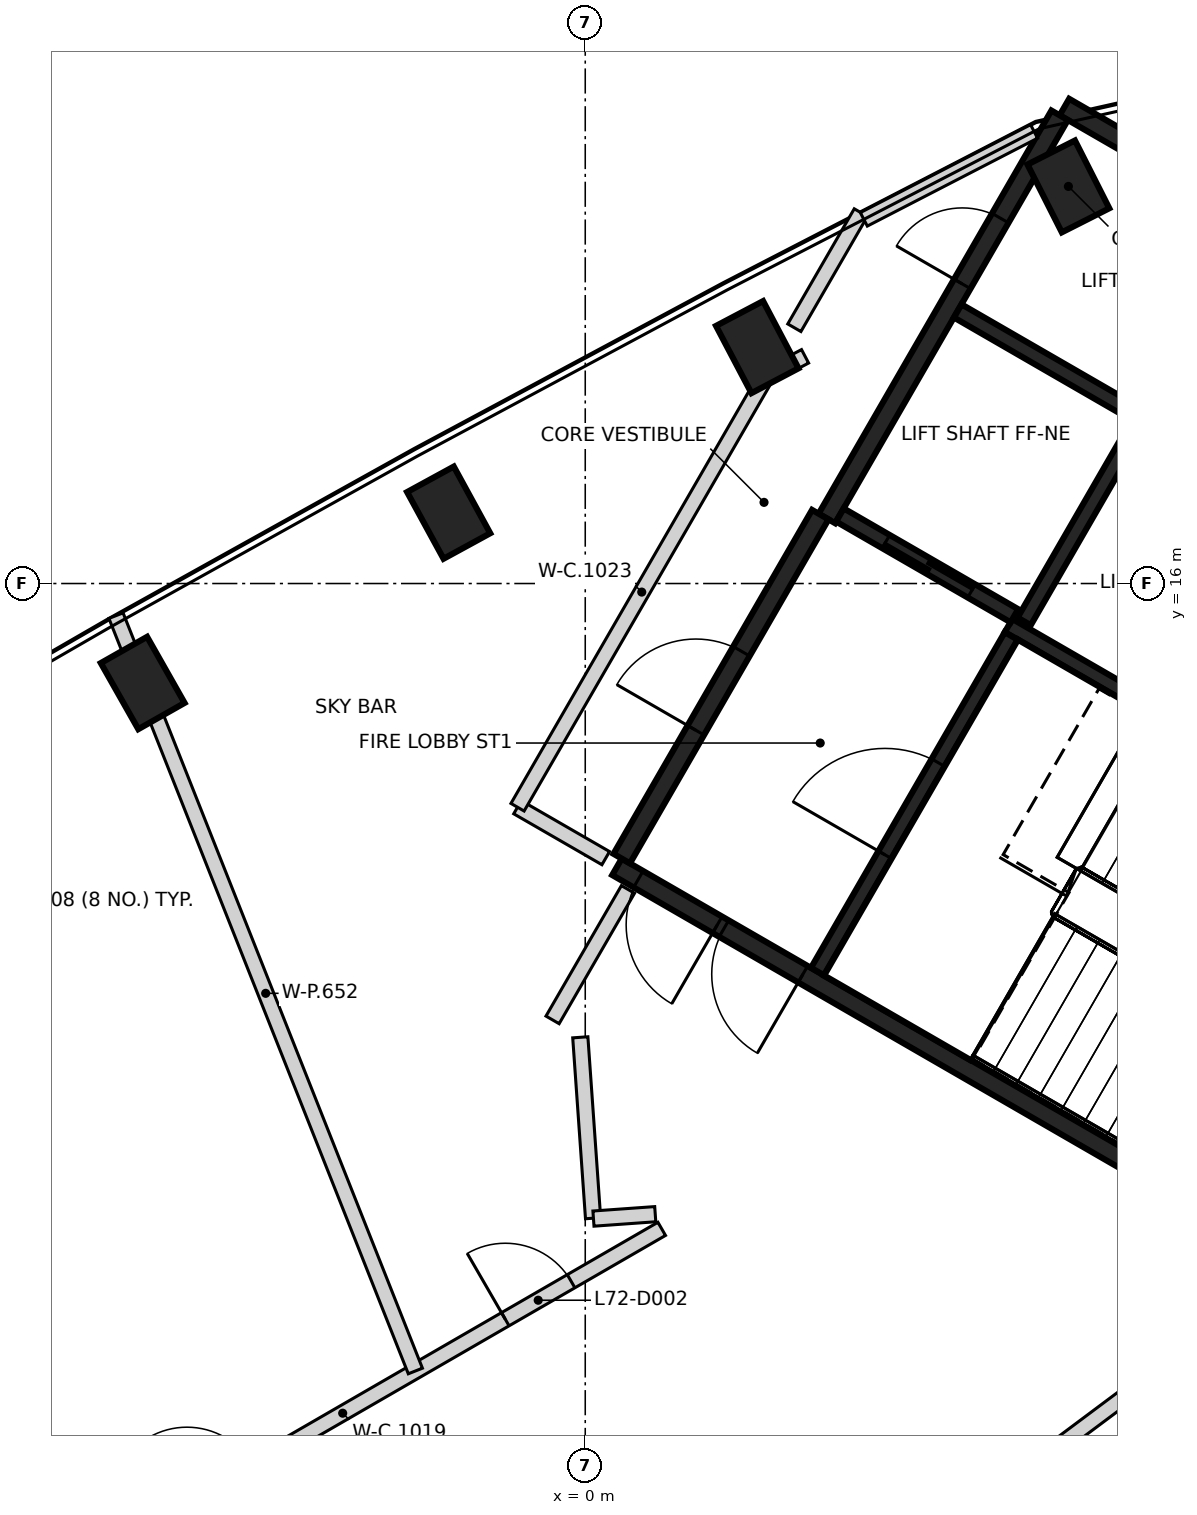
"""IFC4 building model, lengths in metres.
Left out: names, types, materials, properties, quantities, classifications, styles, units other than length and angle.
Written with IfcOpenShell. Run it as: python <this file> out.ifc"""

import sys

from ifc_helpers import new_model, si_unit, direction, frame, frame_2d, origin, origin_2d, place, context, subcontext, project, spatial, rectangle, extrude, element, fill, save


model = new_model("IFC4")
c1 = context("Model", 3, precision=1e-05, world=origin(), true_north=direction((0.0, 1.0)))
c2 = subcontext(c1, "Body", "Model", "MODEL_VIEW")
j1 = project(units=[si_unit("LENGTHUNIT", "METRE"), si_unit("PLANEANGLEUNIT", "RADIAN")], contexts=[c1])
p1 = place(None, origin())
s1 = spatial("IfcSite", under=j1, at=p1, CompositionType="ELEMENT")
p2 = place(p1, origin())
s2 = spatial("IfcBuilding", under=s1, at=p2, CompositionType="ELEMENT")
p3 = place(p2, frame((0.0, 0.0, 283.8)))
s3 = spatial("IfcBuildingStorey", under=s2, at=p3, CompositionType="ELEMENT", Elevation=283.8)
for number, where, z_axis, x_axis in (
    (1, (6.356, 21.224, -0.35), (0.0, 0.0, 1.0), (-0.452, 0.892, 0.0)),
    (2, (2.263, 19.11, -0.35), (0.0, 0.0, 1.0), (-0.466, 0.885, 0.0)),
    (3, (-1.797, 16.932, -0.35), (0.0, 0.0, 1.0), (-0.479, 0.878, 0.0)),
    (4, (-5.822, 14.691, -0.35), (0.0, 0.0, 1.0), (-0.493, 0.87, 0.0)),
):
    element("IfcColumn", number, at=place(p3, frame(where, z_axis=z_axis, x_axis=x_axis)), inside=s3, PredefinedType="COLUMN", context=c2, shape_type="SweptSolid", body=[
        extrude(rectangle(XDim=1.0, YDim=0.7, at=origin_2d()), origin(), (0.0, 0.0, 1.0), 7.2),
    ])
p4 = place(p3, frame((10.42, 6.498, 0.0), z_axis=(0.0, 0.0, 1.0), x_axis=(-0.866021906294, 0.500006057782, 0.0)))
e5 = element("IfcWall", 5, at=p4, inside=s3, PredefinedType="SHEAR", context=c2, shape_type="SweptSolid", body=[
    extrude(rectangle(XDim=11.55, YDim=0.25, at=frame_2d((5.775, 0.0))), origin(), (0.0, 0.0, 1.0), 6.85),
])
p5 = place(p4, frame((10.025, 0.0, 0.0)))
e6 = element("IfcOpeningElement", 6, at=p5, cuts=e5, PredefinedType="OPENING", context=c2, shape_type="SweptSolid", body=[
    extrude(rectangle(XDim=1.2, YDim=2.1, at=frame_2d((0.6, 1.05))), frame((0.0, 0.135, 0.0), z_axis=(0.0, -1.0, 0.0), x_axis=(1.0, 0.0, 0.0)), (0.0, 0.0, 1.0), 0.27),
])
p6 = place(p4, frame((8.725, 0.0, 0.0)))
e7 = element("IfcOpeningElement", 7, at=p6, cuts=e5, PredefinedType="OPENING", context=c2, shape_type="SweptSolid", body=[
    extrude(rectangle(XDim=1.2, YDim=2.1, at=frame_2d((0.6, 1.05))), frame((0.0, 0.135, 0.0), z_axis=(0.0, -1.0, 0.0), x_axis=(1.0, 0.0, 0.0)), (0.0, 0.0, 1.0), 0.27),
])
p7 = place(p3, frame((6.304, 22.269, 0.0), z_axis=(0.0, 0.0, 1.0), x_axis=(0.866022959057, -0.500004234368, 0.0)))
e8 = element("IfcWall", 8, at=p7, inside=s3, PredefinedType="SHEAR", context=c2, shape_type="SweptSolid", body=[
    extrude(rectangle(XDim=8.75, YDim=0.25, at=frame_2d((4.375, 0.0))), origin(), (0.0, 0.0, 1.0), 6.85),
])
p8 = place(p7, frame((3.475, 0.0, 0.0)))
e9 = element("IfcOpeningElement", 9, at=p8, cuts=e8, PredefinedType="OPENING", context=c2, shape_type="SweptSolid", body=[
    extrude(rectangle(XDim=0.9, YDim=2.1, at=frame_2d((0.45, 1.05))), frame((0.0, 0.135, 0.0), z_axis=(0.0, -1.0, 0.0), x_axis=(1.0, 0.0, 0.0)), (0.0, 0.0, 1.0), 0.27),
])
p9 = place(p3, frame((3.179, 16.856, 0.0), z_axis=(0.0, 0.0, 1.0), x_axis=(0.500001955336, 0.866024274868, 0.0)))
e10 = element("IfcWall", 10, at=p9, inside=s3, PredefinedType="SHEAR", context=c2, shape_type="SweptSolid", body=[
    extrude(rectangle(XDim=6.125, YDim=0.25, at=frame_2d((3.062, 0.0))), origin(), (0.0, 0.0, 1.0), 6.85),
])
p10 = place(p9, frame((3.563, 0.0, 0.0)))
e11 = element("IfcOpeningElement", 11, at=p10, cuts=e10, PredefinedType="OPENING", context=c2, shape_type="SweptSolid", body=[
    extrude(rectangle(XDim=1.0, YDim=2.1, at=frame_2d((0.5, 1.05))), frame((0.0, 0.135, 0.0), z_axis=(0.0, -1.0, 0.0), x_axis=(1.0, 0.0, 0.0)), (0.0, 0.0, 1.0), 0.27),
])
p11 = place(p3, frame((0.48, 12.381, 0.0), z_axis=(0.0, 0.0, 1.0), x_axis=(0.49999885962, 0.866026062182, 0.0)))
e12 = element("IfcWall", 12, at=p11, inside=s3, PredefinedType="SHEAR", context=c2, shape_type="SweptSolid", body=[
    extrude(rectangle(XDim=5.225, YDim=0.25, at=frame_2d((2.612, 0.0))), origin(), (0.0, 0.0, 1.0), 6.85),
])
p12 = place(p11, frame((1.949, 0.0, 0.0)))
e13 = element("IfcOpeningElement", 13, at=p12, cuts=e12, PredefinedType="OPENING", context=c2, shape_type="SweptSolid", body=[
    extrude(rectangle(XDim=1.2, YDim=2.1, at=frame_2d((0.6, 1.05))), frame((0.0, 0.135, 0.0), z_axis=(0.0, -1.0, 0.0), x_axis=(1.0, 0.0, 0.0)), (0.0, 0.0, 1.0), 0.27),
])
p13 = place(p3, frame((10.743, 12.46, 0.0), z_axis=(0.0, 0.0, 1.0), x_axis=(-0.866018848283, 0.500011354289, 0.0)))
e14 = element("IfcWall", 14, at=p13, inside=s3, PredefinedType="SHEAR", context=c2, shape_type="SweptSolid", body=[
    extrude(rectangle(XDim=5.974, YDim=0.2, at=frame_2d((2.987, 0.0))), origin(), (0.0, 0.0, 1.0), 6.85),
])
p14 = place(p3, frame((3.057, 10.895, 0.0), z_axis=(0.0, 0.0, 1.0), x_axis=(0.500027839223, 0.866009330205, 0.0)))
e15 = element("IfcWall", 15, at=p14, inside=s3, PredefinedType="SHEAR", context=c2, shape_type="SweptSolid", body=[
    extrude(rectangle(XDim=5.098, YDim=0.2, at=frame_2d((2.549, 0.0))), origin(), (0.0, 0.0, 1.0), 6.85),
])
p15 = place(p14, frame((1.774, 0.0, 0.0)))
e16 = element("IfcOpeningElement", 16, at=p15, cuts=e15, PredefinedType="OPENING", context=c2, shape_type="SweptSolid", body=[
    extrude(rectangle(XDim=1.4, YDim=2.1, at=frame_2d((0.7, 1.05))), frame((0.0, 0.11, 0.0), z_axis=(0.0, -1.0, 0.0), x_axis=(1.0, 0.0, 0.0)), (0.0, 0.0, 1.0), 0.22),
])
p16 = place(p3, frame((7.324, 18.187, 0.0), z_axis=(0.0, 0.0, 1.0), x_axis=(-0.499967891604, -0.866043940782, 0.0)))
e17 = element("IfcWall", 17, at=p16, inside=s3, PredefinedType="SHEAR", context=c2, shape_type="SweptSolid", body=[
    extrude(rectangle(XDim=3.1, YDim=0.2, at=frame_2d((1.55, 0.0))), origin(), (0.0, 0.0, 1.0), 6.85),
])
p17 = place(p3, frame((5.646, 15.576, 0.0), z_axis=(0.0, 0.0, 1.0), x_axis=(-0.866018407898, 0.500012117035, 0.0)))
e18 = element("IfcWall", 18, at=p17, inside=s3, PredefinedType="SHEAR", context=c2, shape_type="SweptSolid", body=[
    extrude(rectangle(XDim=2.651, YDim=0.2, at=frame_2d((1.325, 0.0))), origin(), (0.0, 0.0, 1.0), 6.85),
])
p18 = place(p17, frame((0.652, 0.0, 0.0)))
e19 = element("IfcOpeningElement", 19, at=p18, cuts=e18, PredefinedType="OPENING", context=c2, shape_type="SweptSolid", body=[
    extrude(rectangle(XDim=1.3, YDim=2.1, at=frame_2d((0.65, 1.05))), frame((0.0, 0.11, 0.0), z_axis=(0.0, -1.0, 0.0), x_axis=(1.0, 0.0, 0.0)), (0.0, 0.0, 1.0), 0.22),
])
p19 = place(p3, frame((7.196, 18.26, 0.0), z_axis=(0.0, 0.0, 1.0), x_axis=(-0.866018407898, 0.500012117035, 0.0)))
e20 = element("IfcWall", 20, at=p19, inside=s3, PredefinedType="SHEAR", context=c2, shape_type="SweptSolid", body=[
    extrude(rectangle(XDim=2.651, YDim=0.2, at=frame_2d((1.325, 0.0))), origin(), (0.0, 0.0, 1.0), 6.85),
])
p20 = place(p3, frame((-7.388, 2.659, 0.0), z_axis=(0.0, 0.0, 1.0), x_axis=(0.865840346806, 0.500320391192, 0.0)))
e21 = element("IfcWall", 21, at=p20, inside=s3, PredefinedType="PARTITIONING", context=c2, shape_type="SweptSolid", body=[
    extrude(rectangle(XDim=9.695, YDim=0.2, at=frame_2d((4.848, 0.0))), origin(), (0.0, 0.0, 1.0), 6.85),
])
p21 = place(p20, frame((7.318, 0.0, 0.0)))
e22 = element("IfcOpeningElement", 22, at=p21, cuts=e21, PredefinedType="OPENING", context=c2, shape_type="SweptSolid", body=[
    extrude(rectangle(XDim=1.0, YDim=2.1, at=frame_2d((0.5, 1.05))), frame((0.0, 0.11, 0.0), z_axis=(0.0, -1.0, 0.0), x_axis=(1.0, 0.0, 0.0)), (0.0, 0.0, 1.0), 0.22),
])
p22 = place(p20, frame((2.481, 0.0, 0.0)))
e23 = element("IfcOpeningElement", 23, at=p22, cuts=e21, PredefinedType="OPENING", context=c2, shape_type="SweptSolid", body=[
    extrude(rectangle(XDim=1.0, YDim=2.1, at=frame_2d((0.5, 1.05))), frame((0.0, 0.11, 0.0), z_axis=(0.0, -1.0, 0.0), x_axis=(1.0, 0.0, 0.0)), (0.0, 0.0, 1.0), 0.22),
])
p23 = place(p3, frame((-0.891, 13.057, 0.0), z_axis=(0.0, 0.0, 1.0), x_axis=(0.866082447003, -0.499901185229, 0.0)))
e24 = element("IfcWall", 24, at=p23, inside=s3, PredefinedType="PARTITIONING", context=c2, shape_type="SweptSolid", body=[
    extrude(rectangle(XDim=1.34, YDim=0.2, at=frame_2d((0.67, 0.0))), origin(), (0.0, 0.0, 1.0), 6.85),
])
p24 = place(p3, frame((-0.891, 13.057, 0.0), z_axis=(0.0, 0.0, 1.0), x_axis=(0.499999420379, 0.866025738428, 0.0)))
e25 = element("IfcWall", 25, at=p24, inside=s3, PredefinedType="PARTITIONING", context=c2, shape_type="SweptSolid", body=[
    extrude(rectangle(XDim=6.537, YDim=0.2, at=frame_2d((3.268, 0.0))), origin(), (0.0, 0.0, 1.0), 6.85),
])
p25 = place(p3, frame((-0.43, 10.259, 0.0), z_axis=(0.0, 0.0, 1.0), x_axis=(0.500429403118, 0.865777345797, 0.0)))
e26 = element("IfcWall", 26, at=p25, inside=s3, PredefinedType="PARTITIONING", context=c2, shape_type="SweptSolid", body=[
    extrude(rectangle(XDim=1.983, YDim=0.2, at=frame_2d((0.991, 0.0))), origin(), (0.0, 0.0, 1.0), 6.85),
])
p26 = place(p3, frame((-0.065, 10.03, 0.0), z_axis=(0.0, 0.0, 1.0), x_axis=(0.070396260623, -0.997519105827, 0.0)))
e27 = element("IfcWall", 27, at=p26, inside=s3, PredefinedType="PARTITIONING", context=c2, shape_type="SweptSolid", body=[
    extrude(rectangle(XDim=2.386, YDim=0.2, at=frame_2d((1.193, 0.0))), origin(), (0.0, 0.0, 1.0), 6.85),
])
p27 = place(p3, frame((0.108, 7.645, 0.0), z_axis=(0.0, 0.0, 1.0), x_axis=(0.997476913372, 0.070991600141, 0.0)))
e28 = element("IfcWall", 28, at=p27, inside=s3, PredefinedType="PARTITIONING", context=c2, shape_type="SweptSolid", body=[
    extrude(rectangle(XDim=0.815, YDim=0.2, at=frame_2d((0.407, 0.0))), origin(), (0.0, 0.0, 1.0), 6.85),
])
p28 = place(p3, frame((2.377, 18.718, 0.0), z_axis=(0.0, 0.0, 1.0), x_axis=(0.885009189366, 0.465573554595, 0.0)))
e29 = element("IfcWall", 29, at=p28, inside=s3, PredefinedType="PARTITIONING", context=c2, shape_type="SweptSolid", body=[
    extrude(rectangle(XDim=0.582, YDim=0.2, at=frame_2d((0.291, 0.0))), origin(), (0.0, 0.0, 1.0), 6.85),
])
p29 = place(p3, frame((2.751, 19.365, 0.0), z_axis=(0.0, 0.0, 1.0), x_axis=(0.499952011761, 0.866053108034, 0.0)))
e30 = element("IfcWall", 30, at=p29, inside=s3, PredefinedType="PARTITIONING", context=c2, shape_type="SweptSolid", body=[
    extrude(rectangle(XDim=1.749, YDim=0.2, at=frame_2d((0.875, 0.0))), origin(), (0.0, 0.0, 1.0), 5.95),
])
p30 = place(p3, frame((3.665, 20.791, 0.0), z_axis=(0.0, 0.0, 1.0), x_axis=(0.8885404224, 0.458798341063, 0.0)))
e31 = element("IfcWall", 31, at=p30, inside=s3, PredefinedType="PARTITIONING", context=c2, shape_type="SweptSolid", body=[
    extrude(rectangle(XDim=2.521, YDim=0.2, at=frame_2d((1.26, 0.0))), origin(), (0.0, 0.0, 1.0), 6.85),
])
p31 = place(p3, frame((6.002, 4.485, 0.0), z_axis=(0.0, 0.0, 1.0), x_axis=(0.801184670972, 0.598417181403, 0.0)))
e32 = element("IfcWall", 32, at=p31, inside=s3, PredefinedType="PARTITIONING", context=c2, shape_type="SweptSolid", body=[
    extrude(rectangle(XDim=4.1, YDim=0.2, at=frame_2d((2.05, 0.0))), origin(), (0.0, 0.0, 1.0), 6.85),
])
p32 = place(p3, frame((-6.173, 15.577, 0.0), z_axis=(0.0, 0.0, 1.0), x_axis=(0.368423588366, -0.929658033653, 0.0)))
e33 = element("IfcWall", 33, at=p32, inside=s3, PredefinedType="PARTITIONING", context=c2, shape_type="SweptSolid", body=[
    extrude(rectangle(XDim=10.689, YDim=0.2, at=frame_2d((5.345, 0.0))), origin(), (0.0, 0.0, 1.0), 6.85),
])
p33 = place(p18, origin())
e34 = element("IfcDoor", 34, at=p33, inside=s3, OperationType="SLIDING_TO_RIGHT", PredefinedType="DOOR", context=c2, shape_type="SweptSolid", body=[
    extrude(rectangle(XDim=1.3, YDim=2.1, at=frame_2d((0.65, 1.05))), frame((0.0, 0.025, 0.0), z_axis=(0.0, -1.0, 0.0), x_axis=(1.0, 0.0, 0.0)), (0.0, 0.0, 1.0), 0.05),
])
fill(e19, e34)
p34 = place(p10, origin())
e35 = element("IfcDoor", 35, at=p34, inside=s3, OperationType="SINGLE_SWING_LEFT", PredefinedType="DOOR", context=c2, shape_type="SweptSolid", body=[
    extrude(rectangle(XDim=1.0, YDim=2.1, at=frame_2d((0.5, 1.05))), frame((0.0, 0.025, 0.0), z_axis=(0.0, -1.0, 0.0), x_axis=(1.0, 0.0, 0.0)), (0.0, 0.0, 1.0), 0.05),
])
fill(e11, e35)
p35 = place(p5, origin())
e36 = element("IfcDoor", 36, at=p35, inside=s3, OperationType="SINGLE_SWING_LEFT", PredefinedType="DOOR", context=c2, shape_type="SweptSolid", body=[
    extrude(rectangle(XDim=1.2, YDim=2.1, at=frame_2d((0.6, 1.05))), frame((0.0, 0.025, 0.0), z_axis=(0.0, -1.0, 0.0), x_axis=(1.0, 0.0, 0.0)), (0.0, 0.0, 1.0), 0.05),
])
fill(e6, e36)
p36 = place(p6, origin())
e37 = element("IfcDoor", 37, at=p36, inside=s3, OperationType="SINGLE_SWING_RIGHT", PredefinedType="DOOR", context=c2, shape_type="SweptSolid", body=[
    extrude(rectangle(XDim=1.2, YDim=2.1, at=frame_2d((0.6, 1.05))), frame((0.0, 0.025, 0.0), z_axis=(0.0, -1.0, 0.0), x_axis=(1.0, 0.0, 0.0)), (0.0, 0.0, 1.0), 0.05),
])
fill(e7, e37)
p37 = place(p12, origin())
e38 = element("IfcDoor", 38, at=p37, inside=s3, OperationType="SINGLE_SWING_LEFT", PredefinedType="DOOR", context=c2, shape_type="SweptSolid", body=[
    extrude(rectangle(XDim=1.2, YDim=2.1, at=frame_2d((0.6, 1.05))), frame((0.0, 0.025, 0.0), z_axis=(0.0, -1.0, 0.0), x_axis=(1.0, 0.0, 0.0)), (0.0, 0.0, 1.0), 0.05),
])
fill(e13, e38)
p38 = place(p15, origin())
e39 = element("IfcDoor", 39, at=p38, inside=s3, OperationType="SINGLE_SWING_LEFT", PredefinedType="DOOR", context=c2, shape_type="SweptSolid", body=[
    extrude(rectangle(XDim=1.4, YDim=2.1, at=frame_2d((0.7, 1.05))), frame((0.0, 0.025, 0.0), z_axis=(0.0, -1.0, 0.0), x_axis=(1.0, 0.0, 0.0)), (0.0, 0.0, 1.0), 0.05),
])
fill(e16, e39)
p39 = place(p21, origin())
e40 = element("IfcDoor", 40, at=p39, inside=s3, OperationType="SINGLE_SWING_LEFT", PredefinedType="DOOR", context=c2, shape_type="SweptSolid", body=[
    extrude(rectangle(XDim=1.0, YDim=2.1, at=frame_2d((0.5, 1.05))), frame((0.0, 0.025, 0.0), z_axis=(0.0, -1.0, 0.0), x_axis=(1.0, 0.0, 0.0)), (0.0, 0.0, 1.0), 0.05),
])
fill(e22, e40)
save(model, sys.argv[1])
